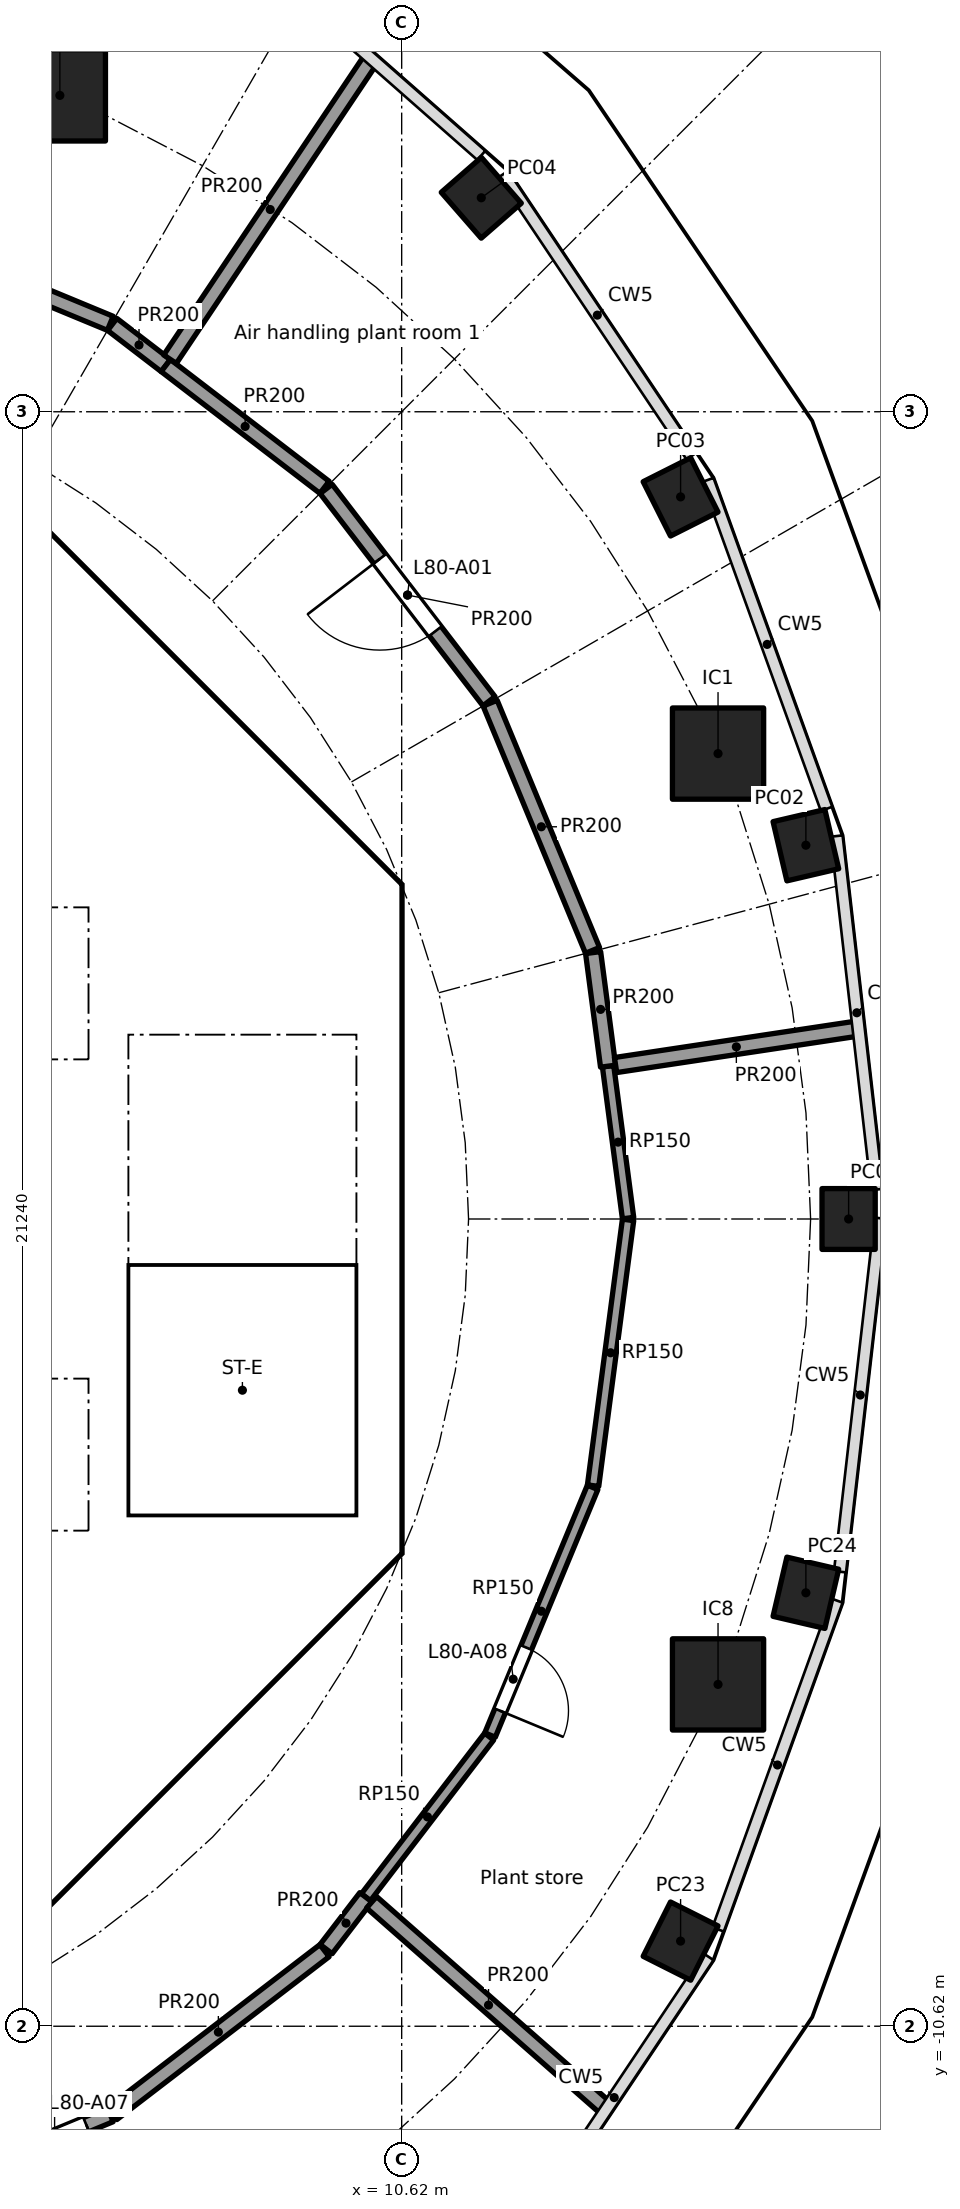
"""IFC4 building model, lengths in metres.
Left out: names, types, materials, properties, quantities, classifications, styles, units other than length and angle.
Written with IfcOpenShell. Run it as: python <this file> out.ifc"""

import sys

from ifc_helpers import new_model, si_unit, direction, frame, frame_2d, origin, origin_2d, place, context, subcontext, project, spatial, polyline, rectangle, hollow_rectangle, outline, extrude, element, fill, save


model = new_model("IFC4")
c1 = context("Model", 3, precision=1e-05, world=origin(), true_north=direction((0.0, 1.0)))
c2 = subcontext(c1, "Body", "Model", "MODEL_VIEW")
j1 = project(units=[si_unit("LENGTHUNIT", "METRE"), si_unit("PLANEANGLEUNIT", "RADIAN")], contexts=[c1])
p1 = place(None, origin())
s1 = spatial("IfcSite", under=j1, at=p1, CompositionType="ELEMENT")
p2 = place(p1, origin())
s2 = spatial("IfcBuilding", under=s1, at=p2, CompositionType="ELEMENT")
p3 = place(p2, frame((0.0, 0.0, 324.9)))
s3 = spatial("IfcBuildingStorey", under=s2, at=p3, CompositionType="ELEMENT", Elevation=324.9)
for number, where, z_axis, x_axis in (
    (1, (16.5, 0.0, 0.0), (0.0, 0.0, 1.0), (0.0, 1.0, 0.0)),
    (2, (15.938, 4.917, 0.0), (0.0, 0.0, 1.0), (-0.227, 0.974, 0.0)),
    (3, (14.289, 9.5, 0.0), (0.0, 0.0, 1.0), (-0.45, 0.893, 0.0)),
    (4, (11.667, 13.435, 0.0), (0.0, 0.0, 1.0), (-0.657, 0.754, 0.0)),
    (5, (14.289, -9.5, 0.0), (0.0, 0.0, 1.0), (0.45, 0.893, 0.0)),
    (6, (15.938, -4.917, 0.0), (0.0, 0.0, 1.0), (0.227, 0.974, 0.0)),
):
    element("IfcColumn", number, at=place(p3, frame(where, z_axis=z_axis, x_axis=x_axis)), inside=s3, PredefinedType="COLUMN", context=c2, shape_type="SweptSolid", body=[
        extrude(hollow_rectangle(XDim=0.8, YDim=0.7, WallThickness=0.025, at=origin_2d()), origin(), (0.0, 0.0, 1.0), 4.0),
    ])
for number, where, z_axis, x_axis in (
    (7, (14.782, 6.123, 0.0), (0.0, 0.0, 1.0), (1.0, 0.0, 0.0)),
    (8, (6.123, 14.782, 0.0), (0.0, 0.0, 1.0), (1.0, 0.0, 0.0)),
    (9, (14.782, -6.123, 0.0), (0.0, 0.0, 1.0), (1.0, 0.0, 0.0)),
):
    element("IfcColumn", number, at=place(p3, frame(where, z_axis=z_axis, x_axis=x_axis)), inside=s3, PredefinedType="COLUMN", context=c2, shape_type="SweptSolid", body=[
        extrude(rectangle(XDim=1.2, YDim=1.2, at=origin_2d()), origin(), (0.0, 0.0, 1.0), 4.0),
    ])
p4 = place(p3, frame((9.988, 4.613, 0.0), z_axis=(0.0, 0.0, 1.0), x_axis=(-0.707106781187, 0.707106781187, 0.0)))
e10 = element("IfcWall", 10, at=p4, inside=s3, PredefinedType="SHEAR", context=c2, shape_type="SweptSolid", body=[
    extrude(rectangle(XDim=7.602, YDim=0.6, at=frame_2d((3.801, 0.0))), origin(), (0.0, 0.0, 1.0), 3.7),
])
p5 = place(p4, frame((3.201, 0.0, 0.0)))
e11 = element("IfcOpeningElement", 11, at=p5, cuts=e10, PredefinedType="OPENING", context=c2, shape_type="SweptSolid", body=[
    extrude(rectangle(XDim=1.2, YDim=2.1, at=frame_2d((0.6, 1.05))), frame((0.0, 0.31, 0.0), z_axis=(0.0, -1.0, 0.0), x_axis=(1.0, 0.0, 0.0)), (0.0, 0.0, 1.0), 0.62),
])
p6 = place(p3, frame((4.613, -9.988, 0.0), z_axis=(0.0, 0.0, 1.0), x_axis=(0.707106781187, 0.707106781187, 0.0)))
e12 = element("IfcWall", 12, at=p6, inside=s3, PredefinedType="SHEAR", context=c2, shape_type="SweptSolid", body=[
    extrude(rectangle(XDim=7.602, YDim=0.6, at=frame_2d((3.801, 0.0))), origin(), (0.0, 0.0, 1.0), 3.7),
])
p7 = place(p6, frame((3.201, 0.0, 0.0)))
e13 = element("IfcOpeningElement", 13, at=p7, cuts=e12, PredefinedType="OPENING", context=c2, shape_type="SweptSolid", body=[
    extrude(rectangle(XDim=1.2, YDim=2.1, at=frame_2d((0.6, 1.05))), frame((0.0, 0.31, 0.0), z_axis=(0.0, -1.0, 0.0), x_axis=(1.0, 0.0, 0.0)), (0.0, 0.0, 1.0), 0.62),
])
p8 = place(p3, frame((-6.7, 2.0, 0.0), z_axis=(0.0, 0.0, 1.0), x_axis=(1.0, 0.0, 0.0)))
e14 = element("IfcWall", 14, at=p8, inside=s3, PredefinedType="SOLIDWALL", context=c2, shape_type="SweptSolid", body=[
    extrude(rectangle(XDim=13.4, YDim=0.2, at=frame_2d((6.7, 0.0))), origin(), (0.0, 0.0, 1.0), 3.7),
])
p9 = place(p8, frame((1.85, 0.0, 0.0)))
e15 = element("IfcOpeningElement", 15, at=p9, cuts=e14, PredefinedType="OPENING", context=c2, shape_type="SweptSolid", body=[
    extrude(rectangle(XDim=0.9, YDim=2.1, at=frame_2d((0.45, 1.05))), frame((0.0, 0.11, 0.0), z_axis=(0.0, -1.0, 0.0), x_axis=(1.0, 0.0, 0.0)), (0.0, 0.0, 1.0), 0.22),
])
p10 = place(p8, frame((5.15, 0.0, 0.0)))
e16 = element("IfcOpeningElement", 16, at=p10, cuts=e14, PredefinedType="OPENING", context=c2, shape_type="SweptSolid", body=[
    extrude(rectangle(XDim=0.9, YDim=2.1, at=frame_2d((0.45, 1.05))), frame((0.0, 0.11, 0.0), z_axis=(0.0, -1.0, 0.0), x_axis=(1.0, 0.0, 0.0)), (0.0, 0.0, 1.0), 0.22),
])
p11 = place(p8, frame((8.45, 0.0, 0.0)))
e17 = element("IfcOpeningElement", 17, at=p11, cuts=e14, PredefinedType="OPENING", context=c2, shape_type="SweptSolid", body=[
    extrude(rectangle(XDim=0.9, YDim=2.1, at=frame_2d((0.45, 1.05))), frame((0.0, 0.11, 0.0), z_axis=(0.0, -1.0, 0.0), x_axis=(1.0, 0.0, 0.0)), (0.0, 0.0, 1.0), 0.22),
])
p12 = place(p3, frame((6.7, 4.0, 0.0), z_axis=(0.0, 0.0, 1.0), x_axis=(1.0, 0.0, 0.0)))
e18 = element("IfcWall", 18, at=p12, inside=s3, PredefinedType="SOLIDWALL", context=c2, shape_type="SweptSolid", body=[
    extrude(rectangle(XDim=3.325, YDim=0.2, at=frame_2d((1.662, 0.0))), origin(), (0.0, 0.0, 1.0), 3.7),
])
p13 = place(p12, frame((1.25, 0.0, 0.0)))
e19 = element("IfcOpeningElement", 19, at=p13, cuts=e18, PredefinedType="OPENING", context=c2, shape_type="SweptSolid", body=[
    extrude(rectangle(XDim=1.1, YDim=2.1, at=frame_2d((0.55, 1.05))), frame((0.0, 0.11, 0.0), z_axis=(0.0, -1.0, 0.0), x_axis=(1.0, 0.0, 0.0)), (0.0, 0.0, 1.0), 0.22),
])
p14 = place(p3, frame((-6.7, -2.0, 0.0), z_axis=(0.0, 0.0, 1.0), x_axis=(1.0, 0.0, 0.0)))
e20 = element("IfcWall", 20, at=p14, inside=s3, PredefinedType="SOLIDWALL", context=c2, shape_type="SweptSolid", body=[
    extrude(rectangle(XDim=13.4, YDim=0.2, at=frame_2d((6.7, 0.0))), origin(), (0.0, 0.0, 1.0), 3.7),
])
p15 = place(p14, frame((1.85, 0.0, 0.0)))
e21 = element("IfcOpeningElement", 21, at=p15, cuts=e20, PredefinedType="OPENING", context=c2, shape_type="SweptSolid", body=[
    extrude(rectangle(XDim=0.9, YDim=2.1, at=frame_2d((0.45, 1.05))), frame((0.0, 0.11, 0.0), z_axis=(0.0, -1.0, 0.0), x_axis=(1.0, 0.0, 0.0)), (0.0, 0.0, 1.0), 0.22),
])
p16 = place(p14, frame((5.15, 0.0, 0.0)))
e22 = element("IfcOpeningElement", 22, at=p16, cuts=e20, PredefinedType="OPENING", context=c2, shape_type="SweptSolid", body=[
    extrude(rectangle(XDim=0.9, YDim=2.1, at=frame_2d((0.45, 1.05))), frame((0.0, 0.11, 0.0), z_axis=(0.0, -1.0, 0.0), x_axis=(1.0, 0.0, 0.0)), (0.0, 0.0, 1.0), 0.22),
])
p17 = place(p14, frame((7.35, 0.0, 0.0)))
e23 = element("IfcOpeningElement", 23, at=p17, cuts=e20, PredefinedType="OPENING", context=c2, shape_type="SweptSolid", body=[
    extrude(rectangle(XDim=0.9, YDim=2.1, at=frame_2d((0.45, 1.05))), frame((0.0, 0.11, 0.0), z_axis=(0.0, -1.0, 0.0), x_axis=(1.0, 0.0, 0.0)), (0.0, 0.0, 1.0), 0.22),
])
p18 = place(p3, origin())
e24 = element("IfcWall", 24, at=p18, inside=s3, PredefinedType="SHEAR", context=c2, shape_type="SweptSolid", body=[
    extrude(outline(polyline([(9.776, -4.401), (10.025, -4.152), (10.025, -3.801), (10.025, 4.152), (9.776, 4.401), (10.2, 4.825), (10.625, 4.401), (10.625, -4.401), (10.2, -4.825), (9.776, -4.401)])), origin(), (0.0, 0.0, 1.0), 3.7),
])
p19 = place(p3, origin())
e25 = element("IfcWall", 25, at=p19, inside=s3, PredefinedType="SOLIDWALL", context=c2, shape_type="SweptSolid", body=[
    extrude(outline(polyline([(-6.7, 4.3), (6.7, 4.3), (6.7, 2.1), (6.5, 2.1), (6.5, 4.1), (4.5, 4.1), (4.5, 2.1), (4.3, 2.1), (4.3, 4.1), (0.1, 4.1), (0.1, 2.1), (-0.1, 2.1), (-0.1, 4.1), (-2.1, 4.1), (-2.1, 2.1), (-2.3, 2.1), (-2.3, 4.1), (-6.5, 4.1), (-6.5, 2.1), (-6.7, 2.1), (-6.7, 4.3)])), origin(), (0.0, 0.0, 1.0), 3.7),
])
p20 = place(p3, origin())
e26 = element("IfcWall", 26, at=p20, inside=s3, PredefinedType="SOLIDWALL", context=c2, shape_type="SweptSolid", body=[
    extrude(outline(polyline([(-6.7, -2.1), (-6.5, -2.1), (-6.5, -4.1), (-2.3, -4.1), (-2.3, -2.1), (-2.1, -2.1), (-2.1, -4.1), (-0.1, -4.1), (-0.1, -2.1), (0.1, -2.1), (0.1, -4.1), (2.1, -4.1), (2.1, -2.1), (2.3, -2.1), (2.3, -4.1), (4.3, -4.1), (4.3, -2.1), (4.5, -2.1), (4.5, -4.1), (6.5, -4.1), (6.5, -2.1), (6.7, -2.1), (6.7, -4.3), (-6.7, -4.3), (-6.7, -2.1)])), origin(), (0.0, 0.0, 1.0), 3.7),
])
p21 = place(p3, origin())
e27 = element("IfcWall", 27, at=p21, inside=s3, PredefinedType="SOLIDWALL", context=c2, shape_type="SweptSolid", body=[
    extrude(outline(polyline([(7.025, -3.9), (6.7, -3.9), (6.7, 3.9), (7.025, 3.9), (7.025, -3.9)])), origin(), (0.0, 0.0, 1.0), 3.7),
])
p22 = place(p3, origin())
e28 = element("IfcWall", 28, at=p22, inside=s3, PredefinedType="SOLIDWALL", context=c2, shape_type="SweptSolid", body=[
    extrude(outline(polyline([(10.025, -4.1), (6.7, -4.1), (6.7, -3.9), (10.025, -3.9), (10.025, -4.1)])), origin(), (0.0, 0.0, 1.0), 3.7),
])
p23 = place(p3, frame((11.771, -6.809, 0.0), z_axis=(0.0, 0.0, 1.0), x_axis=(-0.608731606531, -0.793376222993, 0.0)))
e29 = element("IfcWall", 29, at=p23, inside=s3, PredefinedType="PARTITIONING", context=c2, shape_type="SweptSolid", body=[
    extrude(rectangle(XDim=2.664, YDim=0.15, at=frame_2d((1.332, 0.0))), origin(), (0.0, 0.0, 1.0), 3.7),
])
p24 = place(p3, frame((13.132, -3.531, 0.0), z_axis=(0.0, 0.0, 1.0), x_axis=(-0.382677866108, -0.923881838111, 0.0)))
e30 = element("IfcWall", 30, at=p24, inside=s3, PredefinedType="PARTITIONING", context=c2, shape_type="SweptSolid", body=[
    extrude(rectangle(XDim=3.527, YDim=0.15, at=frame_2d((1.763, 0.0))), origin(), (0.0, 0.0, 1.0), 3.7),
])
p25 = place(p24, frame((2.281, 0.0, 0.0)))
e31 = element("IfcOpeningElement", 31, at=p25, cuts=e30, PredefinedType="OPENING", context=c2, shape_type="SweptSolid", body=[
    extrude(rectangle(XDim=0.9, YDim=2.1, at=frame_2d((0.45, 1.05))), frame((0.0, 0.085, 0.0), z_axis=(0.0, -1.0, 0.0), x_axis=(1.0, 0.0, 0.0)), (0.0, 0.0, 1.0), 0.17),
])
p26 = place(p3, frame((13.335, 2.01, 0.0), z_axis=(0.0, 0.0, 1.0), x_axis=(0.130545357325, -0.991442338051, 0.0)))
e32 = element("IfcWall", 32, at=p26, inside=s3, PredefinedType="PARTITIONING", context=c2, shape_type="SweptSolid", body=[
    extrude(rectangle(XDim=2.016, YDim=0.15, at=frame_2d((1.008, 0.0))), origin(), (0.0, 0.0, 1.0), 3.7),
])
p27 = place(p3, frame((13.598, -0.012, 0.0), z_axis=(0.0, 0.0, 1.0), x_axis=(-0.130499283623, -0.991448403586, 0.0)))
e33 = element("IfcWall", 33, at=p27, inside=s3, PredefinedType="PARTITIONING", context=c2, shape_type="SweptSolid", body=[
    extrude(rectangle(XDim=3.527, YDim=0.15, at=frame_2d((1.763, 0.0))), origin(), (0.0, 0.0, 1.0), 3.7),
])
p28 = place(p3, frame((3.534, 13.131, 0.0), z_axis=(0.0, 0.0, 1.0), x_axis=(0.92386297064, -0.382723413813, 0.0)))
e34 = element("IfcWall", 34, at=p28, inside=s3, PredefinedType="PARTITIONING", context=c2, shape_type="SweptSolid", body=[
    extrude(rectangle(XDim=3.52, YDim=0.2, at=frame_2d((1.76, 0.0))), origin(), (0.0, 0.0, 1.0), 3.7),
])
p29 = place(p3, frame((6.786, -11.784, 0.0), z_axis=(0.0, 0.0, 1.0), x_axis=(-0.92386297064, -0.382723413813, 0.0)))
e35 = element("IfcWall", 35, at=p29, inside=s3, PredefinedType="PARTITIONING", context=c2, shape_type="SweptSolid", body=[
    extrude(rectangle(XDim=3.52, YDim=0.2, at=frame_2d((1.76, 0.0))), origin(), (0.0, 0.0, 1.0), 3.7),
])
p30 = place(p29, frame((0.342, 0.0, 0.0)))
e36 = element("IfcOpeningElement", 36, at=p30, cuts=e35, PredefinedType="OPENING", context=c2, shape_type="SweptSolid", body=[
    extrude(rectangle(XDim=0.9, YDim=2.1, at=frame_2d((0.45, 1.05))), frame((0.0, 0.11, 0.0), z_axis=(0.0, -1.0, 0.0), x_axis=(1.0, 0.0, 0.0)), (0.0, 0.0, 1.0), 0.22),
])
p31 = place(p3, frame((6.812, 11.769, 0.0), z_axis=(0.0, 0.0, 1.0), x_axis=(0.793420478802, -0.608673922407, 0.0)))
e37 = element("IfcWall", 37, at=p31, inside=s3, PredefinedType="PARTITIONING", context=c2, shape_type="SweptSolid", body=[
    extrude(rectangle(XDim=0.888, YDim=0.2, at=frame_2d((0.444, 0.0))), origin(), (0.0, 0.0, 1.0), 3.7),
])
p32 = place(p3, frame((7.517, 11.228, 0.0), z_axis=(0.0, 0.0, 1.0), x_axis=(0.793395797287, -0.608706093979, 0.0)))
e38 = element("IfcWall", 38, at=p32, inside=s3, PredefinedType="PARTITIONING", context=c2, shape_type="SweptSolid", body=[
    extrude(rectangle(XDim=2.632, YDim=0.2, at=frame_2d((1.316, 0.0))), origin(), (0.0, 0.0, 1.0), 3.7),
])
p33 = place(p3, frame((7.572, 11.311, 0.0), z_axis=(0.0, 0.0, 1.0), x_axis=(0.55629198168, 0.830986901893, 0.0)))
e39 = element("IfcWall", 39, at=p33, inside=s3, PredefinedType="PARTITIONING", context=c2, shape_type="SweptSolid", body=[
    extrude(rectangle(XDim=4.74, YDim=0.2, at=frame_2d((2.37, 0.0))), origin(), (0.0, 0.0, 1.0), 3.7),
])
p34 = place(p3, frame((9.605, -9.626, 0.0), z_axis=(0.0, 0.0, 1.0), x_axis=(-0.793402024283, -0.608697977542, 0.0)))
e40 = element("IfcWall", 40, at=p34, inside=s3, PredefinedType="PARTITIONING", context=c2, shape_type="SweptSolid", body=[
    extrude(rectangle(XDim=3.52, YDim=0.2, at=frame_2d((1.76, 0.0))), origin(), (0.0, 0.0, 1.0), 3.7),
])
p35 = place(p3, frame((9.626, 9.605, 0.0), z_axis=(0.0, 0.0, 1.0), x_axis=(0.608697977542, -0.793402024283, 0.0)))
e41 = element("IfcWall", 41, at=p35, inside=s3, PredefinedType="PARTITIONING", context=c2, shape_type="SweptSolid", body=[
    extrude(rectangle(XDim=3.52, YDim=0.2, at=frame_2d((1.76, 0.0))), origin(), (0.0, 0.0, 1.0), 3.7),
])
p36 = place(p35, frame((1.16, 0.0, 0.0)))
e42 = element("IfcOpeningElement", 42, at=p36, cuts=e41, PredefinedType="OPENING", context=c2, shape_type="SweptSolid", body=[
    extrude(rectangle(XDim=1.2, YDim=2.1, at=frame_2d((0.6, 1.05))), frame((0.0, 0.11, 0.0), z_axis=(0.0, -1.0, 0.0), x_axis=(1.0, 0.0, 0.0)), (0.0, 0.0, 1.0), 0.22),
])
p37 = place(p3, frame((10.149, -8.923, 0.0), z_axis=(0.0, 0.0, 1.0), x_axis=(-0.608694005511, -0.793405071609, 0.0)))
e43 = element("IfcWall", 43, at=p37, inside=s3, PredefinedType="PARTITIONING", context=c2, shape_type="SweptSolid", body=[
    extrude(rectangle(XDim=0.859, YDim=0.2, at=frame_2d((0.43, 0.0))), origin(), (0.0, 0.0, 1.0), 3.7),
])
p38 = place(p3, frame((11.784, 6.786, 0.0), z_axis=(0.0, 0.0, 1.0), x_axis=(0.382723413813, -0.92386297064, 0.0)))
e44 = element("IfcWall", 44, at=p38, inside=s3, PredefinedType="PARTITIONING", context=c2, shape_type="SweptSolid", body=[
    extrude(rectangle(XDim=3.52, YDim=0.2, at=frame_2d((1.76, 0.0))), origin(), (0.0, 0.0, 1.0), 3.7),
])
p39 = place(p3, frame((13.301, -11.695, 0.0), z_axis=(0.0, 0.0, 1.0), x_axis=(-0.750994766266, 0.660308156122, 0.0)))
e45 = element("IfcWall", 45, at=p39, inside=s3, PredefinedType="PARTITIONING", context=c2, shape_type="SweptSolid", body=[
    extrude(rectangle(XDim=4.097, YDim=0.2, at=frame_2d((2.049, 0.0))), origin(), (0.0, 0.0, 1.0), 3.7),
])
p40 = place(p3, frame((13.139, 3.505, 0.0), z_axis=(0.0, 0.0, 1.0), x_axis=(0.130391662061, -0.99146256332, 0.0)))
e46 = element("IfcWall", 46, at=p40, inside=s3, PredefinedType="PARTITIONING", context=c2, shape_type="SweptSolid", body=[
    extrude(rectangle(XDim=1.507, YDim=0.2, at=frame_2d((0.754, 0.0))), origin(), (0.0, 0.0, 1.0), 3.7),
])
p41 = place(p3, frame((13.434, 2.025, 0.0), z_axis=(0.0, 0.0, 1.0), x_axis=(0.988817905908, 0.149127961685, 0.0)))
e47 = element("IfcWall", 47, at=p41, inside=s3, PredefinedType="PARTITIONING", context=c2, shape_type="SweptSolid", body=[
    extrude(rectangle(XDim=3.214, YDim=0.2, at=frame_2d((1.607, 0.0))), origin(), (0.0, 0.0, 1.0), 3.7),
])
p42 = place(p13, frame((1.1, 0.0, 0.0), x_axis=(-1.0, 0.0, 0.0)))
e48 = element("IfcDoor", 48, at=p42, inside=s3, OperationType="SINGLE_SWING_LEFT", PredefinedType="DOOR", context=c2, shape_type="SweptSolid", body=[
    extrude(rectangle(XDim=1.1, YDim=2.1, at=frame_2d((0.55, 1.05))), frame((0.0, 0.025, 0.0), z_axis=(0.0, -1.0, 0.0), x_axis=(1.0, 0.0, 0.0)), (0.0, 0.0, 1.0), 0.05),
])
fill(e19, e48)
p43 = place(p5, origin())
e49 = element("IfcDoor", 49, at=p43, inside=s3, OperationType="SINGLE_SWING_LEFT", PredefinedType="DOOR", context=c2, shape_type="SweptSolid", body=[
    extrude(rectangle(XDim=1.2, YDim=2.1, at=frame_2d((0.6, 1.05))), frame((0.0, 0.025, 0.0), z_axis=(0.0, -1.0, 0.0), x_axis=(1.0, 0.0, 0.0)), (0.0, 0.0, 1.0), 0.05),
])
fill(e11, e49)
p44 = place(p7, origin())
e50 = element("IfcDoor", 50, at=p44, inside=s3, OperationType="SINGLE_SWING_LEFT", PredefinedType="DOOR", context=c2, shape_type="SweptSolid", body=[
    extrude(rectangle(XDim=1.2, YDim=2.1, at=frame_2d((0.6, 1.05))), frame((0.0, 0.025, 0.0), z_axis=(0.0, -1.0, 0.0), x_axis=(1.0, 0.0, 0.0)), (0.0, 0.0, 1.0), 0.05),
])
fill(e13, e50)
p45 = place(p36, frame((1.2, 0.0, 0.0), x_axis=(-1.0, 0.0, 0.0)))
e51 = element("IfcDoor", 51, at=p45, inside=s3, OperationType="SINGLE_SWING_RIGHT", PredefinedType="DOOR", context=c2, shape_type="SweptSolid", body=[
    extrude(rectangle(XDim=1.2, YDim=2.1, at=frame_2d((0.6, 1.05))), frame((0.0, 0.025, 0.0), z_axis=(0.0, -1.0, 0.0), x_axis=(1.0, 0.0, 0.0)), (0.0, 0.0, 1.0), 0.05),
])
fill(e42, e51)
p46 = place(p30, origin())
e52 = element("IfcDoor", 52, at=p46, inside=s3, OperationType="SINGLE_SWING_LEFT", PredefinedType="DOOR", context=c2, shape_type="SweptSolid", body=[
    extrude(rectangle(XDim=0.9, YDim=2.1, at=frame_2d((0.45, 1.05))), frame((0.0, 0.025, 0.0), z_axis=(0.0, -1.0, 0.0), x_axis=(1.0, 0.0, 0.0)), (0.0, 0.0, 1.0), 0.05),
])
fill(e36, e52)
p47 = place(p25, origin())
e53 = element("IfcDoor", 53, at=p47, inside=s3, OperationType="SINGLE_SWING_RIGHT", PredefinedType="DOOR", context=c2, shape_type="SweptSolid", body=[
    extrude(rectangle(XDim=0.9, YDim=2.1, at=frame_2d((0.45, 1.05))), frame((0.0, 0.025, 0.0), z_axis=(0.0, -1.0, 0.0), x_axis=(1.0, 0.0, 0.0)), (0.0, 0.0, 1.0), 0.05),
])
fill(e31, e53)
save(model, sys.argv[1])
